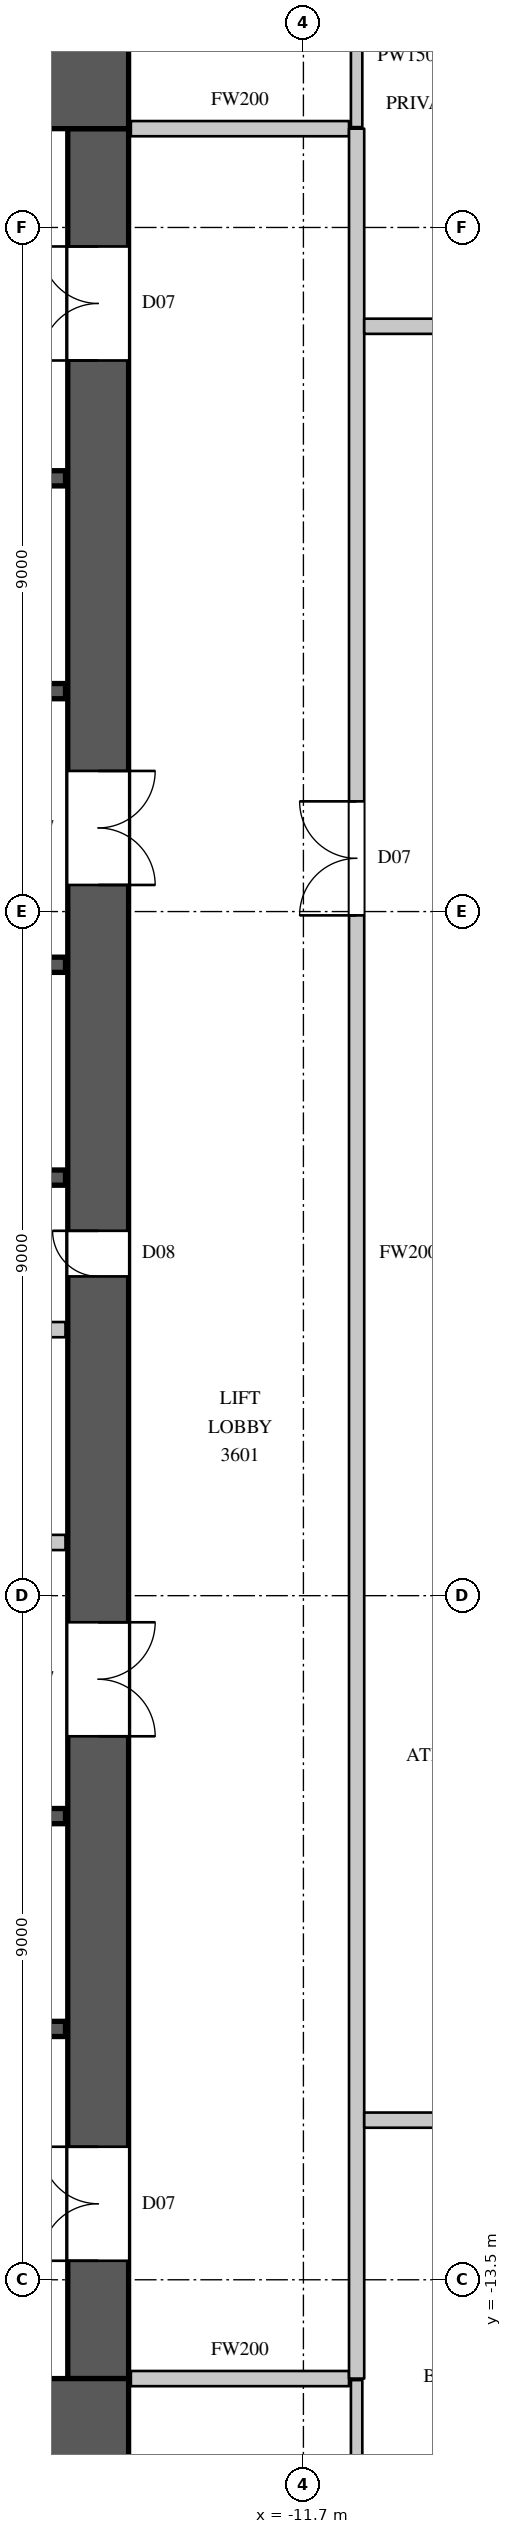
"""IFC4 building model, lengths in metres.
Left out: names, types, materials, properties, quantities, classifications, styles, units other than length and angle.
Written with IfcOpenShell. Run it as: python <this file> out.ifc"""

import sys

from ifc_helpers import new_model, si_unit, direction, frame, frame_2d, origin, place, context, subcontext, project, spatial, rectangle, extrude, element, fill, save


model = new_model("IFC4")
c1 = context("Model", 3, precision=1e-05, world=origin(), true_north=direction((0.0, 1.0)))
c2 = subcontext(c1, "Body", "Model", "MODEL_VIEW")
j1 = project(units=[si_unit("LENGTHUNIT", "METRE"), si_unit("PLANEANGLEUNIT", "RADIAN")], contexts=[c1])
p1 = place(None, origin())
s1 = spatial("IfcSite", under=j1, at=p1, CompositionType="ELEMENT")
p2 = place(p1, origin())
s2 = spatial("IfcBuilding", under=s1, at=p2, CompositionType="ELEMENT")
p3 = place(p2, frame((0.0, 0.0, 168.7)))
s3 = spatial("IfcBuildingStorey", under=s2, at=p3, CompositionType="ELEMENT", Elevation=168.7)
for number, where, z_axis, x_axis in (
    (1, (-30.0, 15.4, 0.0), (0.0, 0.0, 1.0), (1.0, 0.0, 0.0)),
    (2, (-30.0, -15.4, 0.0), (0.0, 0.0, 1.0), (1.0, 0.0, 0.0)),
):
    element("IfcWall", number, at=place(p3, frame(where, z_axis=z_axis, x_axis=x_axis)), inside=s3, PredefinedType="SHEAR", context=c2, shape_type="SweptSolid", body=[
        extrude(rectangle(XDim=16.0, YDim=1.2, at=frame_2d((8.0, 0.0))), origin(), (0.0, 0.0, 1.0), 4.1),
    ])
p4 = place(p3, frame((-14.4, -14.8, 0.0), z_axis=(0.0, 0.0, 1.0), x_axis=(0.0, 1.0, 0.0)))
e3 = element("IfcWall", 3, at=p4, inside=s3, PredefinedType="SHEAR", context=c2, shape_type="SweptSolid", body=[
    extrude(rectangle(XDim=29.6, YDim=0.8, at=frame_2d((14.8, 0.0))), origin(), (0.0, 0.0, 1.0), 4.1),
])
p5 = place(p4, frame((1.55, 0.0, 0.0)))
e4 = element("IfcOpeningElement", 4, at=p5, cuts=e3, PredefinedType="OPENING", context=c2, shape_type="SweptSolid", body=[
    extrude(rectangle(XDim=1.5, YDim=2.4, at=frame_2d((0.75, 1.2))), frame((0.0, 0.41, 0.0), z_axis=(0.0, -1.0, 0.0), x_axis=(1.0, 0.0, 0.0)), (0.0, 0.0, 1.0), 0.82),
])
p6 = place(p4, frame((26.55, 0.0, 0.0)))
e5 = element("IfcOpeningElement", 5, at=p6, cuts=e3, PredefinedType="OPENING", context=c2, shape_type="SweptSolid", body=[
    extrude(rectangle(XDim=1.5, YDim=2.4, at=frame_2d((0.75, 1.2))), frame((0.0, 0.41, 0.0), z_axis=(0.0, -1.0, 0.0), x_axis=(1.0, 0.0, 0.0)), (0.0, 0.0, 1.0), 0.82),
])
p7 = place(p4, frame((8.45, 0.0, 0.0)))
e6 = element("IfcOpeningElement", 6, at=p7, cuts=e3, PredefinedType="OPENING", context=c2, shape_type="SweptSolid", body=[
    extrude(rectangle(XDim=1.5, YDim=2.4, at=frame_2d((0.75, 1.2))), frame((0.0, 0.41, 0.0), z_axis=(0.0, -1.0, 0.0), x_axis=(1.0, 0.0, 0.0)), (0.0, 0.0, 1.0), 0.82),
])
p8 = place(p4, frame((19.65, 0.0, 0.0)))
e7 = element("IfcOpeningElement", 7, at=p8, cuts=e3, PredefinedType="OPENING", context=c2, shape_type="SweptSolid", body=[
    extrude(rectangle(XDim=1.5, YDim=2.4, at=frame_2d((0.75, 1.2))), frame((0.0, 0.41, 0.0), z_axis=(0.0, -1.0, 0.0), x_axis=(1.0, 0.0, 0.0)), (0.0, 0.0, 1.0), 0.82),
])
p9 = place(p4, frame((14.5, 0.0, 0.0)))
e8 = element("IfcOpeningElement", 8, at=p9, cuts=e3, PredefinedType="OPENING", context=c2, shape_type="SweptSolid", body=[
    extrude(rectangle(XDim=0.6, YDim=2.0, at=frame_2d((0.3, 1.0))), frame((0.0, 0.41, 0.0), z_axis=(0.0, -1.0, 0.0), x_axis=(1.0, 0.0, 0.0)), (0.0, 0.0, 1.0), 0.82),
])
p10 = place(p3, frame((-22.62, -3.8, 0.0), z_axis=(0.0, 0.0, 1.0), x_axis=(1.0, 0.0, 0.0)))
e9 = element("IfcWall", 9, at=p10, inside=s3, PredefinedType="PARTITIONING", context=c2, shape_type="SweptSolid", body=[
    extrude(rectangle(XDim=7.79, YDim=0.2, at=frame_2d((3.895, 0.0))), origin(), (0.0, 0.0, 1.0), 3.8),
])
p11 = place(p10, frame((3.45, 0.0, 0.0)))
e10 = element("IfcOpeningElement", 10, at=p11, cuts=e9, PredefinedType="OPENING", context=c2, shape_type="SweptSolid", body=[
    extrude(rectangle(XDim=0.9, YDim=2.2, at=frame_2d((0.45, 1.1))), frame((0.0, 0.11, 0.0), z_axis=(0.0, -1.0, 0.0), x_axis=(1.0, 0.0, 0.0)), (0.0, 0.0, 1.0), 0.22),
])
for number, where, z_axis, x_axis in (
    (11, (-13.97, -14.8, 0.0), (0.0, 0.0, 1.0), (1.0, 0.0, 0.0)),
    (12, (-13.97, 14.8, 0.0), (0.0, 0.0, 1.0), (1.0, 0.0, 0.0)),
):
    element("IfcWall", number, at=place(p3, frame(where, z_axis=z_axis, x_axis=x_axis)), inside=s3, PredefinedType="PARTITIONING", context=c2, shape_type="SweptSolid", body=[
        extrude(rectangle(XDim=2.87, YDim=0.2, at=frame_2d((1.435, 0.0))), origin(), (0.0, 0.0, 1.0), 3.8),
    ])
p12 = place(p3, frame((-11.0, -14.8, 0.0), z_axis=(0.0, 0.0, 1.0), x_axis=(0.0, 1.0, 0.0)))
e13 = element("IfcWall", 13, at=p12, inside=s3, PredefinedType="PARTITIONING", context=c2, shape_type="SweptSolid", body=[
    extrude(rectangle(XDim=29.6, YDim=0.2, at=frame_2d((14.8, 0.0))), origin(), (0.0, 0.0, 1.0), 3.8),
])
p13 = place(p12, frame((19.25, 0.0, 0.0)))
e14 = element("IfcOpeningElement", 14, at=p13, cuts=e13, PredefinedType="OPENING", context=c2, shape_type="SweptSolid", body=[
    extrude(rectangle(XDim=1.5, YDim=2.4, at=frame_2d((0.75, 1.2))), frame((0.0, 0.11, 0.0), z_axis=(0.0, -1.0, 0.0), x_axis=(1.0, 0.0, 0.0)), (0.0, 0.0, 1.0), 0.22),
])
p14 = place(p3, frame((-10.9, -11.4, 0.0), z_axis=(0.0, 0.0, 1.0), x_axis=(1.0, 0.0, 0.0)))
e15 = element("IfcWall", 15, at=p14, inside=s3, PredefinedType="PARTITIONING", context=c2, shape_type="SweptSolid", body=[
    extrude(rectangle(XDim=21.2, YDim=0.2, at=frame_2d((10.6, 0.0))), origin(), (0.0, 0.0, 1.0), 3.8),
])
p15 = place(p14, frame((0.95, 0.0, 0.0)))
e16 = element("IfcOpeningElement", 16, at=p15, cuts=e15, PredefinedType="OPENING", context=c2, shape_type="SweptSolid", body=[
    extrude(rectangle(XDim=0.95, YDim=2.2, at=frame_2d((0.475, 1.1))), frame((0.0, 0.11, 0.0), z_axis=(0.0, -1.0, 0.0), x_axis=(1.0, 0.0, 0.0)), (0.0, 0.0, 1.0), 0.22),
])
p16 = place(p14, frame((4.2, 0.0, 0.0)))
e17 = element("IfcOpeningElement", 17, at=p16, cuts=e15, PredefinedType="OPENING", context=c2, shape_type="SweptSolid", body=[
    extrude(rectangle(XDim=0.95, YDim=2.2, at=frame_2d((0.475, 1.1))), frame((0.0, 0.11, 0.0), z_axis=(0.0, -1.0, 0.0), x_axis=(1.0, 0.0, 0.0)), (0.0, 0.0, 1.0), 0.22),
])
p17 = place(p14, frame((7.1, 0.0, 0.0)))
e18 = element("IfcOpeningElement", 18, at=p17, cuts=e15, PredefinedType="OPENING", context=c2, shape_type="SweptSolid", body=[
    extrude(rectangle(XDim=0.9, YDim=2.2, at=frame_2d((0.45, 1.1))), frame((0.0, 0.11, 0.0), z_axis=(0.0, -1.0, 0.0), x_axis=(1.0, 0.0, 0.0)), (0.0, 0.0, 1.0), 0.22),
])
p18 = place(p14, frame((10.0, 0.0, 0.0)))
e19 = element("IfcOpeningElement", 19, at=p18, cuts=e15, PredefinedType="OPENING", context=c2, shape_type="SweptSolid", body=[
    extrude(rectangle(XDim=0.9, YDim=2.2, at=frame_2d((0.45, 1.1))), frame((0.0, 0.11, 0.0), z_axis=(0.0, -1.0, 0.0), x_axis=(1.0, 0.0, 0.0)), (0.0, 0.0, 1.0), 0.22),
])
p19 = place(p14, frame((13.55, 0.0, 0.0)))
e20 = element("IfcOpeningElement", 20, at=p19, cuts=e15, PredefinedType="OPENING", context=c2, shape_type="SweptSolid", body=[
    extrude(rectangle(XDim=0.9, YDim=2.2, at=frame_2d((0.45, 1.1))), frame((0.0, 0.11, 0.0), z_axis=(0.0, -1.0, 0.0), x_axis=(1.0, 0.0, 0.0)), (0.0, 0.0, 1.0), 0.22),
])
p20 = place(p14, frame((17.85, 0.0, 0.0)))
e21 = element("IfcOpeningElement", 21, at=p20, cuts=e15, PredefinedType="OPENING", context=c2, shape_type="SweptSolid", body=[
    extrude(rectangle(XDim=1.1, YDim=2.4, at=frame_2d((0.55, 1.2))), frame((0.0, 0.11, 0.0), z_axis=(0.0, -1.0, 0.0), x_axis=(1.0, 0.0, 0.0)), (0.0, 0.0, 1.0), 0.22),
])
p21 = place(p3, frame((-10.9, 12.2, 0.0), z_axis=(0.0, 0.0, 1.0), x_axis=(1.0, 0.0, 0.0)))
e22 = element("IfcWall", 22, at=p21, inside=s3, PredefinedType="PARTITIONING", context=c2, shape_type="SweptSolid", body=[
    extrude(rectangle(XDim=3.704, YDim=0.2, at=frame_2d((1.852, 0.0))), origin(), (0.0, 0.0, 1.0), 3.8),
])
p22 = place(p21, frame((1.7, 0.0, 0.0)))
e23 = element("IfcOpeningElement", 23, at=p22, cuts=e22, PredefinedType="OPENING", context=c2, shape_type="SweptSolid", body=[
    extrude(rectangle(XDim=1.1, YDim=2.4, at=frame_2d((0.55, 1.2))), frame((0.0, 0.11, 0.0), z_axis=(0.0, -1.0, 0.0), x_axis=(1.0, 0.0, 0.0)), (0.0, 0.0, 1.0), 0.22),
])
for number, where, z_axis, x_axis in (
    (24, (-11.0, -16.7, 0.0), (0.0, 0.0, 1.0), (0.0, 1.0, 0.0)),
    (25, (-11.0, 14.82, 0.0), (0.0, 0.0, 1.0), (0.0, 1.0, 0.0)),
):
    element("IfcWall", number, at=place(p3, frame(where, z_axis=z_axis, x_axis=x_axis)), inside=s3, PredefinedType="PARTITIONING", context=c2, shape_type="SweptSolid", body=[
        extrude(rectangle(XDim=1.88, YDim=0.15, at=frame_2d((0.94, 0.0))), origin(), (0.0, 0.0, 1.0), 3.8),
    ])
p23 = place(p3, frame((-29.17, -1.0, 0.0), z_axis=(0.0, 0.0, 1.0), x_axis=(1.0, 0.0, 0.0)))
e26 = element("IfcWall", 26, at=p23, inside=s3, PredefinedType="PARTITIONING", context=c2, shape_type="SweptSolid", body=[
    extrude(rectangle(XDim=14.34, YDim=0.2, at=frame_2d((7.17, 0.0))), origin(), (0.0, 0.0, 1.0), 3.8),
])
p24 = place(p3, frame((-26.08, 1.0, 0.0), z_axis=(0.0, 0.0, 1.0), x_axis=(1.0, 0.0, 0.0)))
e27 = element("IfcWall", 27, at=p24, inside=s3, PredefinedType="SHEAR", context=c2, shape_type="SweptSolid", body=[
    extrude(rectangle(XDim=11.25, YDim=0.2, at=frame_2d((5.625, 0.0))), origin(), (0.0, 0.0, 1.0), 3.8),
])
p25 = place(p3, frame((-26.08, 3.8, 0.0), z_axis=(0.0, 0.0, 1.0), x_axis=(1.0, 0.0, 0.0)))
e28 = element("IfcWall", 28, at=p25, inside=s3, PredefinedType="SHEAR", context=c2, shape_type="SweptSolid", body=[
    extrude(rectangle(XDim=11.25, YDim=0.2, at=frame_2d((5.625, 0.0))), origin(), (0.0, 0.0, 1.0), 3.8),
])
p26 = place(p25, frame((0.8, 0.0, 0.0)))
e29 = element("IfcOpeningElement", 29, at=p26, cuts=e28, PredefinedType="OPENING", context=c2, shape_type="SweptSolid", body=[
    extrude(rectangle(XDim=1.1, YDim=2.2, at=frame_2d((0.55, 1.1))), frame((0.0, 0.11, 0.0), z_axis=(0.0, -1.0, 0.0), x_axis=(1.0, 0.0, 0.0)), (0.0, 0.0, 1.0), 0.22),
])
p27 = place(p25, frame((3.55, 0.0, 0.0)))
e30 = element("IfcOpeningElement", 30, at=p27, cuts=e28, PredefinedType="OPENING", context=c2, shape_type="SweptSolid", body=[
    extrude(rectangle(XDim=1.1, YDim=2.2, at=frame_2d((0.55, 1.1))), frame((0.0, 0.11, 0.0), z_axis=(0.0, -1.0, 0.0), x_axis=(1.0, 0.0, 0.0)), (0.0, 0.0, 1.0), 0.22),
])
p28 = place(p25, frame((6.25, 0.0, 0.0)))
e31 = element("IfcOpeningElement", 31, at=p28, cuts=e28, PredefinedType="OPENING", context=c2, shape_type="SweptSolid", body=[
    extrude(rectangle(XDim=1.1, YDim=2.2, at=frame_2d((0.55, 1.1))), frame((0.0, 0.11, 0.0), z_axis=(0.0, -1.0, 0.0), x_axis=(1.0, 0.0, 0.0)), (0.0, 0.0, 1.0), 0.22),
])
p29 = place(p25, frame((9.15, 0.0, 0.0)))
e32 = element("IfcOpeningElement", 32, at=p29, cuts=e28, PredefinedType="OPENING", context=c2, shape_type="SweptSolid", body=[
    extrude(rectangle(XDim=1.1, YDim=2.2, at=frame_2d((0.55, 1.1))), frame((0.0, 0.11, 0.0), z_axis=(0.0, -1.0, 0.0), x_axis=(1.0, 0.0, 0.0)), (0.0, 0.0, 1.0), 0.22),
])
p30 = place(p3, frame((-17.92, -10.2, 0.0), z_axis=(0.0, 0.0, 1.0), x_axis=(1.0, 0.0, 0.0)))
e33 = element("IfcWall", 33, at=p30, inside=s3, PredefinedType="SHEAR", context=c2, shape_type="SweptSolid", body=[
    extrude(rectangle(XDim=3.09, YDim=0.2, at=frame_2d((1.545, 0.0))), origin(), (0.0, 0.0, 1.0), 3.8),
])
p31 = place(p30, frame((1.0, 0.0, 0.0)))
e34 = element("IfcOpeningElement", 34, at=p31, cuts=e33, PredefinedType="OPENING", context=c2, shape_type="SweptSolid", body=[
    extrude(rectangle(XDim=1.1, YDim=2.2, at=frame_2d((0.55, 1.1))), frame((0.0, 0.11, 0.0), z_axis=(0.0, -1.0, 0.0), x_axis=(1.0, 0.0, 0.0)), (0.0, 0.0, 1.0), 0.22),
])
p32 = place(p3, frame((-17.9, -7.4, 0.0), z_axis=(0.0, 0.0, 1.0), x_axis=(1.0, 0.0, 0.0)))
e35 = element("IfcWall", 35, at=p32, inside=s3, PredefinedType="SHEAR", context=c2, shape_type="SweptSolid", body=[
    extrude(rectangle(XDim=3.07, YDim=0.2, at=frame_2d((1.535, 0.0))), origin(), (0.0, 0.0, 1.0), 3.8),
])
p33 = place(p3, frame((-17.92, 7.4, 0.0), z_axis=(0.0, 0.0, 1.0), x_axis=(1.0, 0.0, 0.0)))
e36 = element("IfcWall", 36, at=p33, inside=s3, PredefinedType="SHEAR", context=c2, shape_type="SweptSolid", body=[
    extrude(rectangle(XDim=3.09, YDim=0.2, at=frame_2d((1.545, 0.0))), origin(), (0.0, 0.0, 1.0), 3.8),
])
p34 = place(p3, frame((-17.92, 10.2, 0.0), z_axis=(0.0, 0.0, 1.0), x_axis=(1.0, 0.0, 0.0)))
e37 = element("IfcWall", 37, at=p34, inside=s3, PredefinedType="SHEAR", context=c2, shape_type="SweptSolid", body=[
    extrude(rectangle(XDim=3.09, YDim=0.2, at=frame_2d((1.545, 0.0))), origin(), (0.0, 0.0, 1.0), 3.8),
])
p35 = place(p34, frame((1.0, 0.0, 0.0)))
e38 = element("IfcOpeningElement", 38, at=p35, cuts=e37, PredefinedType="OPENING", context=c2, shape_type="SweptSolid", body=[
    extrude(rectangle(XDim=1.1, YDim=2.2, at=frame_2d((0.55, 1.1))), frame((0.0, 0.11, 0.0), z_axis=(0.0, -1.0, 0.0), x_axis=(1.0, 0.0, 0.0)), (0.0, 0.0, 1.0), 0.22),
])
p36 = place(p13, origin())
e39 = element("IfcDoor", 39, at=p36, inside=s3, OperationType="DOUBLE_DOOR_SINGLE_SWING", PredefinedType="DOOR", context=c2, shape_type="SweptSolid", body=[
    extrude(rectangle(XDim=1.5, YDim=2.4, at=frame_2d((0.75, 1.2))), frame((0.0, 0.025, 0.0), z_axis=(0.0, -1.0, 0.0), x_axis=(1.0, 0.0, 0.0)), (0.0, 0.0, 1.0), 0.05),
])
fill(e14, e39)
p37 = place(p5, origin())
e40 = element("IfcDoor", 40, at=p37, inside=s3, OperationType="DOUBLE_DOOR_SINGLE_SWING", PredefinedType="DOOR", context=c2, shape_type="SweptSolid", body=[
    extrude(rectangle(XDim=1.5, YDim=2.4, at=frame_2d((0.75, 1.2))), frame((0.0, 0.395, 0.0), z_axis=(0.0, -1.0, 0.0), x_axis=(1.0, 0.0, 0.0)), (0.0, 0.0, 1.0), 0.05),
])
fill(e4, e40)
p38 = place(p6, origin())
e41 = element("IfcDoor", 41, at=p38, inside=s3, OperationType="DOUBLE_DOOR_SINGLE_SWING", PredefinedType="DOOR", context=c2, shape_type="SweptSolid", body=[
    extrude(rectangle(XDim=1.5, YDim=2.4, at=frame_2d((0.75, 1.2))), frame((0.0, 0.395, 0.0), z_axis=(0.0, -1.0, 0.0), x_axis=(1.0, 0.0, 0.0)), (0.0, 0.0, 1.0), 0.05),
])
fill(e5, e41)
p39 = place(p7, origin())
e42 = element("IfcDoor", 42, at=p39, inside=s3, OperationType="DOUBLE_DOOR_SINGLE_SWING", PredefinedType="DOOR", context=c2, shape_type="SweptSolid", body=[
    extrude(rectangle(XDim=1.5, YDim=2.4, at=frame_2d((0.75, 1.2))), frame((0.0, -0.345, 0.0), z_axis=(0.0, -1.0, 0.0), x_axis=(1.0, 0.0, 0.0)), (0.0, 0.0, 1.0), 0.05),
])
fill(e6, e42)
p40 = place(p8, origin())
e43 = element("IfcDoor", 43, at=p40, inside=s3, OperationType="DOUBLE_DOOR_SINGLE_SWING", PredefinedType="DOOR", context=c2, shape_type="SweptSolid", body=[
    extrude(rectangle(XDim=1.5, YDim=2.4, at=frame_2d((0.75, 1.2))), frame((0.0, -0.345, 0.0), z_axis=(0.0, -1.0, 0.0), x_axis=(1.0, 0.0, 0.0)), (0.0, 0.0, 1.0), 0.05),
])
fill(e7, e43)
p41 = place(p9, origin())
e44 = element("IfcDoor", 44, at=p41, inside=s3, OperationType="SINGLE_SWING_RIGHT", PredefinedType="DOOR", context=c2, shape_type="SweptSolid", body=[
    extrude(rectangle(XDim=0.6, YDim=2.0, at=frame_2d((0.3, 1.0))), frame((0.0, 0.395, 0.0), z_axis=(0.0, -1.0, 0.0), x_axis=(1.0, 0.0, 0.0)), (0.0, 0.0, 1.0), 0.05),
])
fill(e8, e44)
save(model, sys.argv[1])
